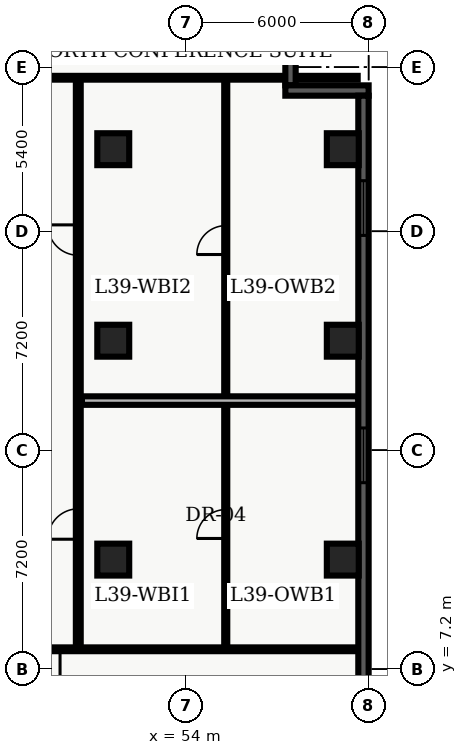
"""IFC4 building model, lengths in metres.
Left out: names, types, materials, properties, quantities, classifications, styles, units other than length and angle.
Written with IfcOpenShell. Run it as: python <this file> out.ifc"""

import sys

from ifc_helpers import new_model, entity, si_unit, converted_unit, direction, frame, origin_with_axes, origin_2d_with_axis, place, context, subcontext, project, spatial, polyline, rectangle, outline, extrude, element, fill, save


model = new_model("IFC4")
c1 = context("Model", 3, precision=1e-05, world=origin_with_axes(), true_north=direction((0.0, 1.0)))
c2 = subcontext(c1, "Body", "Model", "MODEL_VIEW")
j1 = project(units=[si_unit("LENGTHUNIT", "METRE"), converted_unit("PLANEANGLEUNIT", "DEGREE", entity("IfcPlaneAngleMeasure", 0.017), si_unit("PLANEANGLEUNIT", "RADIAN"), dimensions=[0, 0, 0, 0, 0, 0, 0])], contexts=[c1])
p1 = place(None, origin_with_axes())
s1 = spatial("IfcSite", under=j1, at=p1, CompositionType="ELEMENT")
p2 = place(p1, origin_with_axes())
s2 = spatial("IfcBuilding", under=s1, at=p2, CompositionType="ELEMENT")
p3 = place(p2, frame((0.0, 0.0, 160.2), z_axis=(0.0, 0.0, 1.0), x_axis=(1.0, 0.0, 0.0)))
s3 = spatial("IfcBuildingStorey", under=s2, at=p3, CompositionType="ELEMENT", Elevation=160.2)
for number, where, z_axis, x_axis in (
    (1, (51.6, 10.8, 0.0), (0.0, 0.0, 1.0), (1.0, 0.0, 0.0)),
    (2, (51.6, 18.0, 0.0), (0.0, 0.0, 1.0), (1.0, 0.0, 0.0)),
    (3, (51.6, 24.3, 0.0), (0.0, 0.0, 1.0), (1.0, 0.0, 0.0)),
    (4, (59.15, 10.8, 0.0), (0.0, 0.0, 1.0), (1.0, 0.0, 0.0)),
    (5, (59.15, 18.0, 0.0), (0.0, 0.0, 1.0), (1.0, 0.0, 0.0)),
    (6, (59.15, 24.3, 0.0), (0.0, 0.0, 1.0), (1.0, 0.0, 0.0)),
):
    element("IfcColumn", number, at=place(p3, frame(where, z_axis=z_axis, x_axis=x_axis)), inside=s3, PredefinedType="COLUMN", context=c2, shape_type="SweptSolid", body=[
        extrude(rectangle(XDim=1.05, YDim=1.05, at=origin_2d_with_axis()), origin_with_axes(), (0.0, 0.0, 1.0), 3.9),
    ])
p4 = place(p3, frame((50.45, 7.85, 0.0), z_axis=(0.0, 0.0, 1.0), x_axis=(0.0, 1.0, 0.0)))
e7 = element("IfcWall", 7, at=p4, inside=s3, PredefinedType="PARTITIONING", context=c2, shape_type="SweptSolid", body=[
    extrude(outline(polyline([(0.0, -0.08), (18.8, -0.08), (18.8, 0.08), (0.0, 0.08), (0.0, -0.08)])), origin_with_axes(), (0.0, 0.0, 1.0), 2.7),
])
p5 = place(p4, frame((4.12, 0.0, 0.0), z_axis=(0.0, 0.0, 1.0), x_axis=(1.0, 0.0, 0.0)))
e8 = element("IfcOpeningElement", 8, at=p5, cuts=e7, PredefinedType="OPENING", context=c2, shape_type="SweptSolid", body=[
    extrude(rectangle(XDim=1.0, YDim=0.18, at=origin_2d_with_axis()), origin_with_axes(), (0.0, 0.0, 1.0), 2.15),
])
p6 = place(p4, frame((13.46, 0.0, 0.0), z_axis=(0.0, 0.0, 1.0), x_axis=(1.0, 0.0, 0.0)))
e9 = element("IfcOpeningElement", 9, at=p6, cuts=e7, PredefinedType="OPENING", context=c2, shape_type="SweptSolid", body=[
    extrude(rectangle(XDim=1.0, YDim=0.18, at=origin_2d_with_axis()), origin_with_axes(), (0.0, 0.0, 1.0), 2.15),
])
p7 = place(p3, frame((59.665, 7.85, 0.0), z_axis=(0.0, 0.0, 1.0), x_axis=(-1.0, 0.0, 0.0)))
e10 = element("IfcWall", 10, at=p7, inside=s3, PredefinedType="PARTITIONING", context=c2, shape_type="SweptSolid", body=[
    extrude(outline(polyline([(0.0, -0.062), (11.615, -0.062), (11.615, 0.062), (0.0, 0.062), (0.0, -0.062)])), origin_with_axes(), (0.0, 0.0, 1.0), 2.7),
])
p8 = place(p7, frame((10.315, 0.0, 0.0), z_axis=(0.0, 0.0, 1.0), x_axis=(1.0, 0.0, 0.0)))
e11 = element("IfcOpeningElement", 11, at=p8, cuts=e10, PredefinedType="OPENING", context=c2, shape_type="SweptSolid", body=[
    extrude(rectangle(XDim=1.0, YDim=0.145, at=origin_2d_with_axis()), origin_with_axes(), (0.0, 0.0, 1.0), 2.15),
])
p9 = place(p3, frame((38.735, 26.65, 0.0), z_axis=(0.0, 0.0, 1.0), x_axis=(1.0, 0.0, 0.0)))
e12 = element("IfcWall", 12, at=p9, inside=s3, PredefinedType="PARTITIONING", context=c2, shape_type="SweptSolid", body=[
    extrude(outline(polyline([(0.0, -0.062), (20.905, -0.062), (20.905, 0.062), (0.0, 0.062), (0.0, -0.062)])), origin_with_axes(), (0.0, 0.0, 1.0), 2.7),
])
p10 = place(p9, frame((4.265, 0.0, 0.0), z_axis=(0.0, 0.0, 1.0), x_axis=(1.0, 0.0, 0.0)))
e13 = element("IfcOpeningElement", 13, at=p10, cuts=e12, PredefinedType="OPENING", context=c2, shape_type="SweptSolid", body=[
    extrude(rectangle(XDim=1.0, YDim=0.145, at=origin_2d_with_axis()), origin_with_axes(), (0.0, 0.0, 1.0), 2.15),
])
p11 = place(p3, frame((55.3, 7.98, 0.0), z_axis=(0.0, 0.0, 1.0), x_axis=(0.0, 1.0, 0.0)))
e14 = element("IfcWall", 14, at=p11, inside=s3, PredefinedType="PARTITIONING", context=c2, shape_type="SweptSolid", body=[
    extrude(outline(polyline([(0.0, -0.05), (18.54, -0.05), (18.54, 0.05), (0.0, 0.05), (0.0, -0.05)])), origin_with_axes(), (0.0, 0.0, 1.0), 2.7),
])
p12 = place(p11, frame((3.99, 0.0, 0.0), z_axis=(0.0, 0.0, 1.0), x_axis=(1.0, 0.0, 0.0)))
e15 = element("IfcOpeningElement", 15, at=p12, cuts=e14, PredefinedType="OPENING", context=c2, shape_type="SweptSolid", body=[
    extrude(rectangle(XDim=0.95, YDim=0.12, at=origin_2d_with_axis()), origin_with_axes(), (0.0, 0.0, 1.0), 2.15),
])
p13 = place(p11, frame((13.331, 0.0, 0.0), z_axis=(0.0, 0.0, 1.0), x_axis=(1.0, 0.0, 0.0)))
e16 = element("IfcOpeningElement", 16, at=p13, cuts=e14, PredefinedType="OPENING", context=c2, shape_type="SweptSolid", body=[
    extrude(rectangle(XDim=0.95, YDim=0.12, at=origin_2d_with_axis()), origin_with_axes(), (0.0, 0.0, 1.0), 2.15),
])
p14 = place(p3, frame((50.57, 16.031, 0.0), z_axis=(0.0, 0.0, 1.0), x_axis=(1.0, 0.0, 0.0)))
e17 = element("IfcWall", 17, at=p14, inside=s3, PredefinedType="PARTITIONING", context=c2, shape_type="SweptSolid", body=[
    extrude(outline(polyline([(0.0, -0.14), (9.095, -0.14), (9.095, 0.14), (0.0, 0.14), (0.0, -0.14)])), origin_with_axes(), (0.0, 0.0, 1.0), 2.7),
])
p15 = place(p3, frame((57.43, 28.46, 0.0), z_axis=(0.0, 0.0, 1.0), x_axis=(0.0, -1.0, 0.0)))
e18 = element("IfcWall", 18, at=p15, inside=s3, PredefinedType="SOLIDWALL", context=c2, shape_type="SweptSolid", body=[
    extrude(outline(polyline([(0.0, -0.17), (2.06, -0.17), (2.06, 0.17), (0.0, 0.17), (0.0, -0.17)])), origin_with_axes(), (0.0, 0.0, 1.0), 3.66),
])
p16 = place(p3, frame((57.26, 26.23, 0.0), z_axis=(0.0, 0.0, 1.0), x_axis=(1.0, 0.0, 0.0)))
e19 = element("IfcWall", 19, at=p16, inside=s3, PredefinedType="SOLIDWALL", context=c2, shape_type="SweptSolid", body=[
    extrude(outline(polyline([(0.0, -0.17), (2.74, -0.17), (2.74, 0.17), (0.0, 0.17), (0.0, -0.17)])), origin_with_axes(), (0.0, 0.0, 1.0), 3.66),
])
p17 = place(p3, frame((59.83, 26.06, 0.0), z_axis=(0.0, 0.0, 1.0), x_axis=(0.0, -1.0, 0.0)))
e20 = element("IfcWall", 20, at=p17, inside=s3, PredefinedType="SOLIDWALL", context=c2, shape_type="SweptSolid", body=[
    extrude(outline(polyline([(0.0, -0.17), (23.66, -0.17), (23.66, 0.17), (0.0, 0.17), (0.0, -0.17)])), origin_with_axes(), (0.0, 0.0, 1.0), 3.66),
])
p18 = place(p17, frame((3.696, 0.0, 0.45), z_axis=(0.0, 0.0, 1.0), x_axis=(1.0, 0.0, 0.0)))
e21 = element("IfcOpeningElement", 21, at=p18, cuts=e20, PredefinedType="OPENING", context=c2, shape_type="SweptSolid", body=[
    extrude(rectangle(XDim=1.8, YDim=0.36, at=origin_2d_with_axis()), origin_with_axes(), (0.0, 0.0, 1.0), 2.1),
])
p19 = place(p17, frame((11.83, 0.0, 0.45), z_axis=(0.0, 0.0, 1.0), x_axis=(1.0, 0.0, 0.0)))
e22 = element("IfcOpeningElement", 22, at=p19, cuts=e20, PredefinedType="OPENING", context=c2, shape_type="SweptSolid", body=[
    extrude(rectangle(XDim=1.8, YDim=0.36, at=origin_2d_with_axis()), origin_with_axes(), (0.0, 0.0, 1.0), 2.1),
])
p20 = place(p17, frame((20.364, 0.0, 0.45), z_axis=(0.0, 0.0, 1.0), x_axis=(1.0, 0.0, 0.0)))
e23 = element("IfcOpeningElement", 23, at=p20, cuts=e20, PredefinedType="OPENING", context=c2, shape_type="SweptSolid", body=[
    extrude(rectangle(XDim=1.8, YDim=0.36, at=origin_2d_with_axis()), origin_with_axes(), (0.0, 0.0, 1.0), 2.1),
])
p21 = place(p7, frame((10.315, 0.0, 0.0), z_axis=(0.0, 0.0, 1.0), x_axis=(1.0, 0.0, 0.0)))
e24 = element("IfcDoor", 24, at=p21, inside=s3, OperationType="SINGLE_SWING_LEFT", PredefinedType="DOOR", context=c2, shape_type="SweptSolid", body=[
    extrude(rectangle(XDim=1.0, YDim=0.075, at=origin_2d_with_axis()), origin_with_axes(), (0.0, 0.0, 1.0), 2.15),
])
fill(e11, e24)
p22 = place(p11, frame((3.99, 0.0, 0.0), z_axis=(0.0, 0.0, 1.0), x_axis=(1.0, 0.0, 0.0)))
e25 = element("IfcDoor", 25, at=p22, inside=s3, OperationType="SINGLE_SWING_LEFT", PredefinedType="DOOR", context=c2, shape_type="SweptSolid", body=[
    extrude(rectangle(XDim=0.95, YDim=0.06, at=origin_2d_with_axis()), origin_with_axes(), (0.0, 0.0, 1.0), 2.15),
])
fill(e15, e25)
p23 = place(p4, frame((4.12, 0.0, 0.0), z_axis=(0.0, 0.0, 1.0), x_axis=(1.0, 0.0, 0.0)))
e26 = element("IfcDoor", 26, at=p23, inside=s3, OperationType="SINGLE_SWING_LEFT", PredefinedType="DOOR", context=c2, shape_type="SweptSolid", body=[
    extrude(rectangle(XDim=1.0, YDim=0.09, at=origin_2d_with_axis()), origin_with_axes(), (0.0, 0.0, 1.0), 2.15),
])
fill(e8, e26)
p24 = place(p11, frame((13.331, 0.0, 0.0), z_axis=(0.0, 0.0, 1.0), x_axis=(1.0, 0.0, 0.0)))
e27 = element("IfcDoor", 27, at=p24, inside=s3, OperationType="SINGLE_SWING_LEFT", PredefinedType="DOOR", context=c2, shape_type="SweptSolid", body=[
    extrude(rectangle(XDim=0.95, YDim=0.06, at=origin_2d_with_axis()), origin_with_axes(), (0.0, 0.0, 1.0), 2.15),
])
fill(e16, e27)
p25 = place(p4, frame((13.46, 0.0, 0.0), z_axis=(0.0, 0.0, 1.0), x_axis=(1.0, 0.0, 0.0)))
e28 = element("IfcDoor", 28, at=p25, inside=s3, OperationType="SINGLE_SWING_RIGHT", PredefinedType="DOOR", context=c2, shape_type="SweptSolid", body=[
    extrude(rectangle(XDim=1.0, YDim=0.09, at=origin_2d_with_axis()), origin_with_axes(), (0.0, 0.0, 1.0), 2.15),
])
fill(e9, e28)
p26 = place(p17, frame((3.696, 0.0, 0.45), z_axis=(0.0, 0.0, 1.0), x_axis=(1.0, 0.0, 0.0)))
e29 = element("IfcWindow", 29, at=p26, inside=s3, PredefinedType="WINDOW", context=c2, shape_type="SweptSolid", body=[
    extrude(rectangle(XDim=1.8, YDim=0.09, at=origin_2d_with_axis()), origin_with_axes(), (0.0, 0.0, 1.0), 2.1),
])
fill(e21, e29)
p27 = place(p17, frame((11.83, 0.0, 0.45), z_axis=(0.0, 0.0, 1.0), x_axis=(1.0, 0.0, 0.0)))
e30 = element("IfcWindow", 30, at=p27, inside=s3, PredefinedType="WINDOW", context=c2, shape_type="SweptSolid", body=[
    extrude(rectangle(XDim=1.8, YDim=0.09, at=origin_2d_with_axis()), origin_with_axes(), (0.0, 0.0, 1.0), 2.1),
])
fill(e22, e30)
save(model, sys.argv[1])
